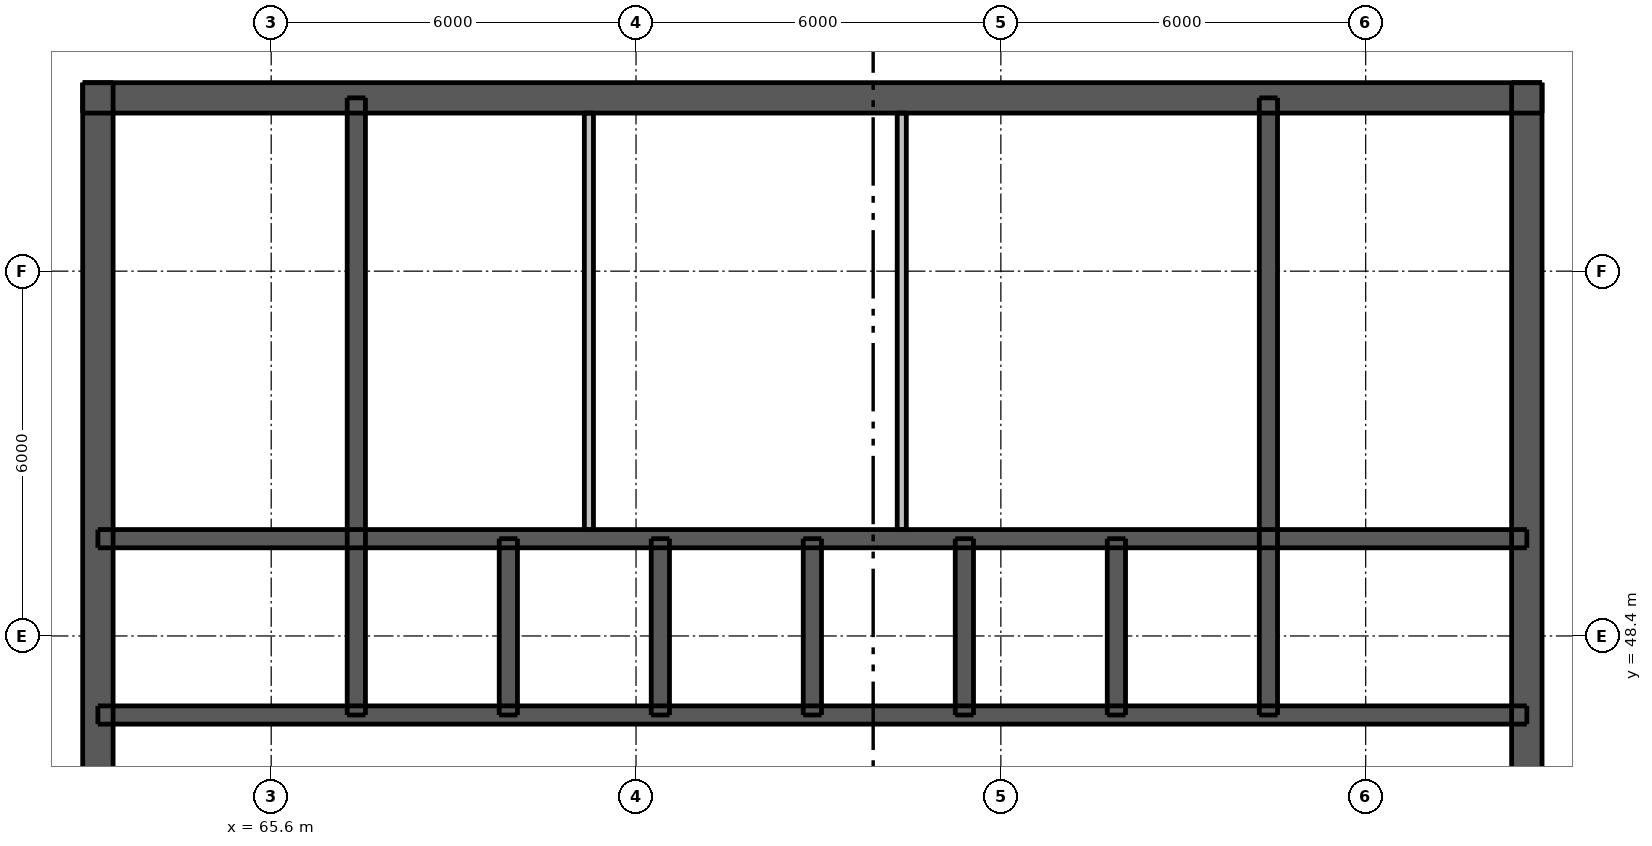
"""IFC4 building model, lengths in metres.
Left out: names, types, materials, properties, quantities, classifications, styles, units other than length and angle.
Written with IfcOpenShell. Run it as: python <this file> out.ifc"""

import sys

from ifc_helpers import new_model, si_unit, direction, frame, frame_2d, origin, place, context, subcontext, project, spatial, rectangle, extrude, element, fill, save


model = new_model("IFC4")
c1 = context("Model", 3, precision=1e-05, world=origin(), true_north=direction((0.0, 1.0)))
c2 = subcontext(c1, "Body", "Model", "MODEL_VIEW")
j1 = project(units=[si_unit("LENGTHUNIT", "METRE"), si_unit("PLANEANGLEUNIT", "RADIAN")], contexts=[c1])
p1 = place(None, origin())
s1 = spatial("IfcSite", under=j1, at=p1, CompositionType="ELEMENT")
p2 = place(p1, origin())
s2 = spatial("IfcBuilding", under=s1, at=p2, CompositionType="ELEMENT")
p3 = place(p2, frame((0.0, 0.0, 248.8)))
s3 = spatial("IfcBuildingStorey", under=s2, at=p3, CompositionType="ELEMENT", Elevation=248.8)
p4 = place(p3, frame((62.5, 57.25, 0.0), z_axis=(0.0, 0.0, 1.0), x_axis=(1.0, 0.0, 0.0)))
e1 = element("IfcWall", 1, at=p4, inside=s3, PredefinedType="SHEAR", context=c2, shape_type="SweptSolid", body=[
    extrude(rectangle(XDim=24.0, YDim=0.5, at=frame_2d((12.0, 0.0))), origin(), (0.0, 0.0, 1.0), 3.05),
])
p5 = place(p4, frame((21.025, 0.0, 0.0)))
e2 = element("IfcOpeningElement", 2, at=p5, cuts=e1, PredefinedType="OPENING", context=c2, shape_type="SweptSolid", body=[
    extrude(rectangle(XDim=1.1, YDim=2.1, at=frame_2d((0.55, 1.05))), frame((0.0, 0.26, 0.0), z_axis=(0.0, -1.0, 0.0), x_axis=(1.0, 0.0, 0.0)), (0.0, 0.0, 1.0), 0.52),
])
p6 = place(p4, frame((1.875, 0.0, 0.0)))
e3 = element("IfcOpeningElement", 3, at=p6, cuts=e1, PredefinedType="OPENING", context=c2, shape_type="SweptSolid", body=[
    extrude(rectangle(XDim=1.1, YDim=2.1, at=frame_2d((0.55, 1.05))), frame((0.0, 0.26, 0.0), z_axis=(0.0, -1.0, 0.0), x_axis=(1.0, 0.0, 0.0)), (0.0, 0.0, 1.0), 0.52),
])
p7 = place(p4, frame((6.038, 0.0, 0.0)))
e4 = element("IfcOpeningElement", 4, at=p7, cuts=e1, PredefinedType="OPENING", context=c2, shape_type="SweptSolid", body=[
    extrude(rectangle(XDim=0.9, YDim=2.1, at=frame_2d((0.45, 1.05))), frame((0.0, 0.26, 0.0), z_axis=(0.0, -1.0, 0.0), x_axis=(1.0, 0.0, 0.0)), (0.0, 0.0, 1.0), 0.52),
])
p8 = place(p4, frame((10.448, 0.0, 0.0)))
e5 = element("IfcOpeningElement", 5, at=p8, cuts=e1, PredefinedType="OPENING", context=c2, shape_type="SweptSolid", body=[
    extrude(rectangle(XDim=0.9, YDim=2.1, at=frame_2d((0.45, 1.05))), frame((0.0, 0.26, 0.0), z_axis=(0.0, -1.0, 0.0), x_axis=(1.0, 0.0, 0.0)), (0.0, 0.0, 1.0), 0.52),
])
p9 = place(p4, frame((15.96, 0.0, 0.0)))
e6 = element("IfcOpeningElement", 6, at=p9, cuts=e1, PredefinedType="OPENING", context=c2, shape_type="SweptSolid", body=[
    extrude(rectangle(XDim=0.9, YDim=2.1, at=frame_2d((0.45, 1.05))), frame((0.0, 0.26, 0.0), z_axis=(0.0, -1.0, 0.0), x_axis=(1.0, 0.0, 0.0)), (0.0, 0.0, 1.0), 0.52),
])
p10 = place(p3, frame((62.75, 33.5, 0.0), z_axis=(0.0, 0.0, 1.0), x_axis=(0.0, 1.0, 0.0)))
e7 = element("IfcWall", 7, at=p10, inside=s3, PredefinedType="SHEAR", context=c2, shape_type="SweptSolid", body=[
    extrude(rectangle(XDim=24.0, YDim=0.5, at=frame_2d((12.0, 0.0))), origin(), (0.0, 0.0, 1.0), 3.05),
])
p11 = place(p10, frame((11.2, 0.0, 0.0)))
e8 = element("IfcOpeningElement", 8, at=p11, cuts=e7, PredefinedType="OPENING", context=c2, shape_type="SweptSolid", body=[
    extrude(rectangle(XDim=1.6, YDim=2.1, at=frame_2d((0.8, 1.05))), frame((0.0, 0.26, 0.0), z_axis=(0.0, -1.0, 0.0), x_axis=(1.0, 0.0, 0.0)), (0.0, 0.0, 1.0), 0.52),
])
p12 = place(p3, frame((86.25, 33.5, 0.0), z_axis=(0.0, 0.0, 1.0), x_axis=(0.0, 1.0, 0.0)))
e9 = element("IfcWall", 9, at=p12, inside=s3, PredefinedType="SHEAR", context=c2, shape_type="SweptSolid", body=[
    extrude(rectangle(XDim=24.0, YDim=0.5, at=frame_2d((12.0, 0.0))), origin(), (0.0, 0.0, 1.0), 3.05),
])
p13 = place(p12, frame((11.2, 0.0, 0.0)))
e10 = element("IfcOpeningElement", 10, at=p13, cuts=e9, PredefinedType="OPENING", context=c2, shape_type="SweptSolid", body=[
    extrude(rectangle(XDim=1.6, YDim=2.1, at=frame_2d((0.8, 1.05))), frame((0.0, 0.26, 0.0), z_axis=(0.0, -1.0, 0.0), x_axis=(1.0, 0.0, 0.0)), (0.0, 0.0, 1.0), 0.52),
])
p14 = place(p3, frame((62.75, 47.1, 0.0), z_axis=(0.0, 0.0, 1.0), x_axis=(1.0, 0.0, 0.0)))
e11 = element("IfcWall", 11, at=p14, inside=s3, PredefinedType="SHEAR", context=c2, shape_type="SweptSolid", body=[
    extrude(rectangle(XDim=23.5, YDim=0.3, at=frame_2d((11.75, 0.0))), origin(), (0.0, 0.0, 1.0), 3.05),
])
p15 = place(p14, frame((1.725, 0.0, 0.0)))
e12 = element("IfcOpeningElement", 12, at=p15, cuts=e11, PredefinedType="OPENING", context=c2, shape_type="SweptSolid", body=[
    extrude(rectangle(XDim=0.9, YDim=2.1, at=frame_2d((0.45, 1.05))), frame((0.0, 0.16, 0.0), z_axis=(0.0, -1.0, 0.0), x_axis=(1.0, 0.0, 0.0)), (0.0, 0.0, 1.0), 0.32),
])
p16 = place(p14, frame((20.875, 0.0, 0.0)))
e13 = element("IfcOpeningElement", 13, at=p16, cuts=e11, PredefinedType="OPENING", context=c2, shape_type="SweptSolid", body=[
    extrude(rectangle(XDim=0.9, YDim=2.1, at=frame_2d((0.45, 1.05))), frame((0.0, 0.16, 0.0), z_axis=(0.0, -1.0, 0.0), x_axis=(1.0, 0.0, 0.0)), (0.0, 0.0, 1.0), 0.32),
])
p17 = place(p14, frame((4.95, 0.0, 0.0)))
e14 = element("IfcOpeningElement", 14, at=p17, cuts=e11, PredefinedType="OPENING", context=c2, shape_type="SweptSolid", body=[
    extrude(rectangle(XDim=1.1, YDim=2.1, at=frame_2d((0.55, 1.05))), frame((0.0, 0.16, 0.0), z_axis=(0.0, -1.0, 0.0), x_axis=(1.0, 0.0, 0.0)), (0.0, 0.0, 1.0), 0.32),
])
p18 = place(p14, frame((7.45, 0.0, 0.0)))
e15 = element("IfcOpeningElement", 15, at=p18, cuts=e11, PredefinedType="OPENING", context=c2, shape_type="SweptSolid", body=[
    extrude(rectangle(XDim=1.1, YDim=2.1, at=frame_2d((0.55, 1.05))), frame((0.0, 0.16, 0.0), z_axis=(0.0, -1.0, 0.0), x_axis=(1.0, 0.0, 0.0)), (0.0, 0.0, 1.0), 0.32),
])
p19 = place(p14, frame((9.95, 0.0, 0.0)))
e16 = element("IfcOpeningElement", 16, at=p19, cuts=e11, PredefinedType="OPENING", context=c2, shape_type="SweptSolid", body=[
    extrude(rectangle(XDim=1.1, YDim=2.1, at=frame_2d((0.55, 1.05))), frame((0.0, 0.16, 0.0), z_axis=(0.0, -1.0, 0.0), x_axis=(1.0, 0.0, 0.0)), (0.0, 0.0, 1.0), 0.32),
])
p20 = place(p14, frame((12.45, 0.0, 0.0)))
e17 = element("IfcOpeningElement", 17, at=p20, cuts=e11, PredefinedType="OPENING", context=c2, shape_type="SweptSolid", body=[
    extrude(rectangle(XDim=1.1, YDim=2.1, at=frame_2d((0.55, 1.05))), frame((0.0, 0.16, 0.0), z_axis=(0.0, -1.0, 0.0), x_axis=(1.0, 0.0, 0.0)), (0.0, 0.0, 1.0), 0.32),
])
p21 = place(p14, frame((14.95, 0.0, 0.0)))
e18 = element("IfcOpeningElement", 18, at=p21, cuts=e11, PredefinedType="OPENING", context=c2, shape_type="SweptSolid", body=[
    extrude(rectangle(XDim=1.1, YDim=2.1, at=frame_2d((0.55, 1.05))), frame((0.0, 0.16, 0.0), z_axis=(0.0, -1.0, 0.0), x_axis=(1.0, 0.0, 0.0)), (0.0, 0.0, 1.0), 0.32),
])
p22 = place(p14, frame((17.45, 0.0, 0.0)))
e19 = element("IfcOpeningElement", 19, at=p22, cuts=e11, PredefinedType="OPENING", context=c2, shape_type="SweptSolid", body=[
    extrude(rectangle(XDim=1.1, YDim=2.1, at=frame_2d((0.55, 1.05))), frame((0.0, 0.16, 0.0), z_axis=(0.0, -1.0, 0.0), x_axis=(1.0, 0.0, 0.0)), (0.0, 0.0, 1.0), 0.32),
])
p23 = place(p3, frame((62.75, 50.0, 0.0), z_axis=(0.0, 0.0, 1.0), x_axis=(1.0, 0.0, 0.0)))
e20 = element("IfcWall", 20, at=p23, inside=s3, PredefinedType="SHEAR", context=c2, shape_type="SweptSolid", body=[
    extrude(rectangle(XDim=23.5, YDim=0.3, at=frame_2d((11.75, 0.0))), origin(), (0.0, 0.0, 1.0), 3.05),
])
for number, where, z_axis, x_axis in (
    (21, (67.0, 47.1, 0.0), (0.0, 0.0, 1.0), (0.0, 1.0, 0.0)),
    (22, (82.0, 47.1, 0.0), (0.0, 0.0, 1.0), (0.0, 1.0, 0.0)),
):
    element("IfcWall", number, at=place(p3, frame(where, z_axis=z_axis, x_axis=x_axis)), inside=s3, PredefinedType="SHEAR", context=c2, shape_type="SweptSolid", body=[
        extrude(rectangle(XDim=10.15, YDim=0.3, at=frame_2d((5.075, 0.0))), origin(), (0.0, 0.0, 1.0), 3.05),
    ])
for number, where, z_axis, x_axis in (
    (23, (69.5, 47.1, 0.0), (0.0, 0.0, 1.0), (0.0, 1.0, 0.0)),
    (24, (72.0, 47.1, 0.0), (0.0, 0.0, 1.0), (0.0, 1.0, 0.0)),
    (25, (74.5, 47.1, 0.0), (0.0, 0.0, 1.0), (0.0, 1.0, 0.0)),
    (26, (77.0, 47.1, 0.0), (0.0, 0.0, 1.0), (0.0, 1.0, 0.0)),
    (27, (79.5, 47.1, 0.0), (0.0, 0.0, 1.0), (0.0, 1.0, 0.0)),
):
    element("IfcWall", number, at=place(p3, frame(where, z_axis=z_axis, x_axis=x_axis)), inside=s3, PredefinedType="SHEAR", context=c2, shape_type="SweptSolid", body=[
        extrude(rectangle(XDim=2.9, YDim=0.3, at=frame_2d((1.45, 0.0))), origin(), (0.0, 0.0, 1.0), 3.05),
    ])
for number, where, z_axis, x_axis in (
    (28, (70.825, 50.15, 0.0), (0.0, 0.0, 1.0), (0.0, 1.0, 0.0)),
    (29, (75.97, 50.15, 0.0), (0.0, 0.0, 1.0), (0.0, 1.0, 0.0)),
):
    element("IfcWall", number, at=place(p3, frame(where, z_axis=z_axis, x_axis=x_axis)), inside=s3, PredefinedType="PLUMBINGWALL", context=c2, shape_type="SweptSolid", body=[
        extrude(rectangle(XDim=6.85, YDim=0.15, at=frame_2d((3.425, 0.0))), origin(), (0.0, 0.0, 1.0), 3.05),
    ])
p24 = place(p5, origin())
e30 = element("IfcDoor", 30, at=p24, inside=s3, OperationType="SINGLE_SWING_RIGHT", PredefinedType="DOOR", context=c2, shape_type="SweptSolid", body=[
    extrude(rectangle(XDim=1.1, YDim=2.1, at=frame_2d((0.55, 1.05))), frame((0.0, -0.188, 0.0), z_axis=(0.0, -1.0, 0.0), x_axis=(1.0, 0.0, 0.0)), (0.0, 0.0, 1.0), 0.05),
])
fill(e2, e30)
p25 = place(p6, origin())
e31 = element("IfcDoor", 31, at=p25, inside=s3, OperationType="SINGLE_SWING_LEFT", PredefinedType="DOOR", context=c2, shape_type="SweptSolid", body=[
    extrude(rectangle(XDim=1.1, YDim=2.1, at=frame_2d((0.55, 1.05))), frame((0.0, -0.188, 0.0), z_axis=(0.0, -1.0, 0.0), x_axis=(1.0, 0.0, 0.0)), (0.0, 0.0, 1.0), 0.05),
])
fill(e3, e31)
p26 = place(p11, origin())
e32 = element("IfcDoor", 32, at=p26, inside=s3, OperationType="DOUBLE_DOOR_SINGLE_SWING", PredefinedType="DOOR", context=c2, shape_type="SweptSolid", body=[
    extrude(rectangle(XDim=1.6, YDim=2.1, at=frame_2d((0.8, 1.05))), frame((0.0, -0.188, 0.0), z_axis=(0.0, -1.0, 0.0), x_axis=(1.0, 0.0, 0.0)), (0.0, 0.0, 1.0), 0.05),
])
fill(e8, e32)
p27 = place(p13, origin())
e33 = element("IfcDoor", 33, at=p27, inside=s3, OperationType="DOUBLE_DOOR_SINGLE_SWING", PredefinedType="DOOR", context=c2, shape_type="SweptSolid", body=[
    extrude(rectangle(XDim=1.6, YDim=2.1, at=frame_2d((0.8, 1.05))), frame((0.0, 0.237, 0.0), z_axis=(0.0, -1.0, 0.0), x_axis=(1.0, 0.0, 0.0)), (0.0, 0.0, 1.0), 0.05),
])
fill(e10, e33)
p28 = place(p15, origin())
e34 = element("IfcDoor", 34, at=p28, inside=s3, OperationType="SINGLE_SWING_LEFT", PredefinedType="DOOR", context=c2, shape_type="SweptSolid", body=[
    extrude(rectangle(XDim=0.9, YDim=2.1, at=frame_2d((0.45, 1.05))), frame((0.0, 0.138, 0.0), z_axis=(0.0, -1.0, 0.0), x_axis=(1.0, 0.0, 0.0)), (0.0, 0.0, 1.0), 0.05),
])
fill(e12, e34)
p29 = place(p16, origin())
e35 = element("IfcDoor", 35, at=p29, inside=s3, OperationType="SINGLE_SWING_LEFT", PredefinedType="DOOR", context=c2, shape_type="SweptSolid", body=[
    extrude(rectangle(XDim=0.9, YDim=2.1, at=frame_2d((0.45, 1.05))), frame((0.0, 0.138, 0.0), z_axis=(0.0, -1.0, 0.0), x_axis=(1.0, 0.0, 0.0)), (0.0, 0.0, 1.0), 0.05),
])
fill(e13, e35)
p30 = place(p7, origin())
e36 = element("IfcDoor", 36, at=p30, inside=s3, OperationType="SINGLE_SWING_RIGHT", PredefinedType="DOOR", context=c2, shape_type="SweptSolid", body=[
    extrude(rectangle(XDim=0.9, YDim=2.1, at=frame_2d((0.45, 1.05))), frame((0.0, -0.188, 0.0), z_axis=(0.0, -1.0, 0.0), x_axis=(1.0, 0.0, 0.0)), (0.0, 0.0, 1.0), 0.05),
])
fill(e4, e36)
p31 = place(p8, origin())
e37 = element("IfcDoor", 37, at=p31, inside=s3, OperationType="SINGLE_SWING_RIGHT", PredefinedType="DOOR", context=c2, shape_type="SweptSolid", body=[
    extrude(rectangle(XDim=0.9, YDim=2.1, at=frame_2d((0.45, 1.05))), frame((0.0, -0.188, 0.0), z_axis=(0.0, -1.0, 0.0), x_axis=(1.0, 0.0, 0.0)), (0.0, 0.0, 1.0), 0.05),
])
fill(e5, e37)
p32 = place(p9, origin())
e38 = element("IfcDoor", 38, at=p32, inside=s3, OperationType="SINGLE_SWING_RIGHT", PredefinedType="DOOR", context=c2, shape_type="SweptSolid", body=[
    extrude(rectangle(XDim=0.9, YDim=2.1, at=frame_2d((0.45, 1.05))), frame((0.0, -0.188, 0.0), z_axis=(0.0, -1.0, 0.0), x_axis=(1.0, 0.0, 0.0)), (0.0, 0.0, 1.0), 0.05),
])
fill(e6, e38)
p33 = place(p17, origin())
e39 = element("IfcDoor", 39, at=p33, inside=s3, OperationType="DOUBLE_DOOR_SLIDING", PredefinedType="DOOR", context=c2, shape_type="SweptSolid", body=[
    extrude(rectangle(XDim=1.1, YDim=2.1, at=frame_2d((0.55, 1.05))), frame((0.0, 0.025, 0.0), z_axis=(0.0, -1.0, 0.0), x_axis=(1.0, 0.0, 0.0)), (0.0, 0.0, 1.0), 0.05),
])
fill(e14, e39)
p34 = place(p18, origin())
e40 = element("IfcDoor", 40, at=p34, inside=s3, OperationType="DOUBLE_DOOR_SLIDING", PredefinedType="DOOR", context=c2, shape_type="SweptSolid", body=[
    extrude(rectangle(XDim=1.1, YDim=2.1, at=frame_2d((0.55, 1.05))), frame((0.0, 0.025, 0.0), z_axis=(0.0, -1.0, 0.0), x_axis=(1.0, 0.0, 0.0)), (0.0, 0.0, 1.0), 0.05),
])
fill(e15, e40)
p35 = place(p19, origin())
e41 = element("IfcDoor", 41, at=p35, inside=s3, OperationType="DOUBLE_DOOR_SLIDING", PredefinedType="DOOR", context=c2, shape_type="SweptSolid", body=[
    extrude(rectangle(XDim=1.1, YDim=2.1, at=frame_2d((0.55, 1.05))), frame((0.0, 0.025, 0.0), z_axis=(0.0, -1.0, 0.0), x_axis=(1.0, 0.0, 0.0)), (0.0, 0.0, 1.0), 0.05),
])
fill(e16, e41)
p36 = place(p20, origin())
e42 = element("IfcDoor", 42, at=p36, inside=s3, OperationType="DOUBLE_DOOR_SLIDING", PredefinedType="DOOR", context=c2, shape_type="SweptSolid", body=[
    extrude(rectangle(XDim=1.1, YDim=2.1, at=frame_2d((0.55, 1.05))), frame((0.0, 0.025, 0.0), z_axis=(0.0, -1.0, 0.0), x_axis=(1.0, 0.0, 0.0)), (0.0, 0.0, 1.0), 0.05),
])
fill(e17, e42)
p37 = place(p21, origin())
e43 = element("IfcDoor", 43, at=p37, inside=s3, OperationType="DOUBLE_DOOR_SLIDING", PredefinedType="DOOR", context=c2, shape_type="SweptSolid", body=[
    extrude(rectangle(XDim=1.1, YDim=2.1, at=frame_2d((0.55, 1.05))), frame((0.0, 0.025, 0.0), z_axis=(0.0, -1.0, 0.0), x_axis=(1.0, 0.0, 0.0)), (0.0, 0.0, 1.0), 0.05),
])
fill(e18, e43)
p38 = place(p22, origin())
e44 = element("IfcDoor", 44, at=p38, inside=s3, OperationType="DOUBLE_DOOR_SLIDING", PredefinedType="DOOR", context=c2, shape_type="SweptSolid", body=[
    extrude(rectangle(XDim=1.1, YDim=2.1, at=frame_2d((0.55, 1.05))), frame((0.0, 0.025, 0.0), z_axis=(0.0, -1.0, 0.0), x_axis=(1.0, 0.0, 0.0)), (0.0, 0.0, 1.0), 0.05),
])
fill(e19, e44)
save(model, sys.argv[1])
